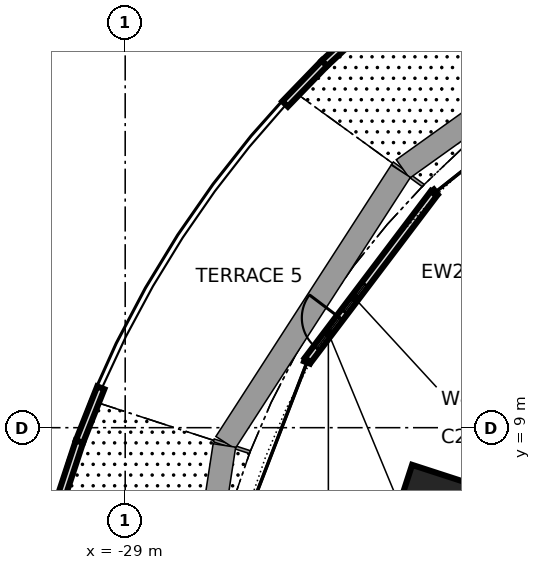
"""IFC4 building model, lengths in metres.
Left out: names, types, materials, properties, quantities, classifications, styles, units other than length and angle.
Written with IfcOpenShell. Run it as: python <this file> out.ifc"""

import sys

from ifc_helpers import new_model, si_unit, direction, frame, frame_2d, origin, origin_2d, place, context, subcontext, project, spatial, rectangle, extrude, element, fill, save


model = new_model("IFC4")
c1 = context("Model", 3, precision=1e-05, world=origin(), true_north=direction((0.0, 1.0)))
c2 = subcontext(c1, "Body", "Model", "MODEL_VIEW")
j1 = project(units=[si_unit("LENGTHUNIT", "METRE"), si_unit("PLANEANGLEUNIT", "RADIAN")], contexts=[c1])
p1 = place(None, origin())
s1 = spatial("IfcSite", under=j1, at=p1, CompositionType="ELEMENT")
p2 = place(p1, origin())
s2 = spatial("IfcBuilding", under=s1, at=p2, CompositionType="ELEMENT")
p3 = place(p2, frame((0.0, 0.0, 19.6)))
s3 = spatial("IfcBuildingStorey", under=s2, at=p3, CompositionType="ELEMENT", Elevation=19.6)
p4 = place(p3, frame((-20.808, 6.761, 0.0), z_axis=(0.0, 0.0, 1.0), x_axis=(-0.951056516295, 0.309016994375, 0.0)))
e1 = element("IfcColumn", 1, at=p4, inside=s3, PredefinedType="COLUMN", context=c2, shape_type="SweptSolid", body=[
    extrude(rectangle(XDim=2.0, YDim=2.0, at=origin_2d()), origin(), (0.0, 0.0, 1.0), 4.2),
])
p5 = place(p3, frame((-20.875, 15.167, 0.0), z_axis=(0.0, 0.0, 1.0), x_axis=(-0.602981695088, -0.797755022164, 0.0)))
e2 = element("IfcWall", 2, at=p5, inside=s3, PredefinedType="SOLIDWALL", context=c2, shape_type="SweptSolid", body=[
    extrude(rectangle(XDim=5.508, YDim=0.2, at=frame_2d((2.754, 0.0))), origin(), (0.0, 0.0, 1.0), 4.04),
])
p6 = place(p5, frame((4.108, 0.0, 0.0)))
e3 = element("IfcOpeningElement", 3, at=p6, cuts=e2, PredefinedType="OPENING", context=c2, shape_type="SweptSolid", body=[
    extrude(rectangle(XDim=1.0, YDim=2.4, at=frame_2d((0.5, 1.2))), frame((0.0, 0.11, 0.0), z_axis=(0.0, -1.0, 0.0), x_axis=(1.0, 0.0, 0.0)), (0.0, 0.0, 1.0), 0.22),
])
p7 = place(p5, frame((3.008, 0.0, 0.3)))
e4 = element("IfcOpeningElement", 4, at=p7, cuts=e2, PredefinedType="OPENING", context=c2, shape_type="SweptSolid", body=[
    extrude(rectangle(XDim=0.9, YDim=2.1, at=frame_2d((0.45, 1.05))), frame((0.0, 0.11, 0.0), z_axis=(0.0, -1.0, 0.0), x_axis=(1.0, 0.0, 0.0)), (0.0, 0.0, 1.0), 0.22),
])
p8 = place(p5, frame((4.108, 0.0, 2.7)))
e5 = element("IfcOpeningElement", 5, at=p8, cuts=e2, PredefinedType="OPENING", context=c2, shape_type="SweptSolid", body=[
    extrude(rectangle(XDim=1.0, YDim=0.6, at=frame_2d((0.5, 0.3))), frame((0.0, 0.11, 0.0), z_axis=(0.0, -1.0, 0.0), x_axis=(1.0, 0.0, 0.0)), (0.0, 0.0, 1.0), 0.22),
])
p9 = place(p3, frame((-22.676, 19.594, 0.0), z_axis=(0.0, 0.0, 1.0), x_axis=(-0.73256401107, -0.68069814873, 0.0)))
e6 = element("IfcWall", 6, at=p9, inside=s3, PredefinedType="PARAPET", context=c2, shape_type="SweptSolid", body=[
    extrude(rectangle(XDim=1.478, YDim=0.2, at=frame_2d((0.739, 0.0))), origin(), (0.0, 0.0, 1.0), 1.1),
])
p10 = place(p3, frame((-23.759, 18.588, 0.0), z_axis=(0.0, 0.0, 1.0), x_axis=(-0.695098509387, -0.718914502738, 0.0)))
e7 = element("IfcWall", 7, at=p10, inside=s3, PredefinedType="PARAPET", context=c2, shape_type="SweptSolid", body=[
    extrude(rectangle(XDim=1.486, YDim=0.2, at=frame_2d((0.743, 0.0))), origin(), (0.0, 0.0, 1.0), 1.1),
])
p11 = place(p3, frame((-29.642, 10.05, 0.0), z_axis=(0.0, 0.0, 1.0), x_axis=(-0.368766467575, -0.92952207741, 0.0)))
e8 = element("IfcWall", 8, at=p11, inside=s3, PredefinedType="PARAPET", context=c2, shape_type="SweptSolid", body=[
    extrude(rectangle(XDim=1.525, YDim=0.2, at=frame_2d((0.762, 0.0))), origin(), (0.0, 0.0, 1.0), 1.1),
])
p12 = place(p3, frame((-30.204, 8.633, 0.0), z_axis=(0.0, 0.0, 1.0), x_axis=(-0.313063429315, -0.949732219747, 0.0)))
e9 = element("IfcWall", 9, at=p12, inside=s3, PredefinedType="PARAPET", context=c2, shape_type="SweptSolid", body=[
    extrude(rectangle(XDim=1.529, YDim=0.2, at=frame_2d((0.764, 0.0))), origin(), (0.0, 0.0, 1.0), 1.1),
])
p13 = place(p6, frame((1.0, 0.0, 0.0), z_axis=(0.0, 0.0, 1.0), x_axis=(-1.0, 0.0, 0.0)))
e10 = element("IfcDoor", 10, at=p13, inside=s3, OperationType="SINGLE_SWING_RIGHT", PredefinedType="DOOR", context=c2, shape_type="SweptSolid", body=[
    extrude(rectangle(XDim=1.0, YDim=2.4, at=frame_2d((0.5, 1.2))), frame((0.0, 0.025, 0.0), z_axis=(0.0, -1.0, 0.0), x_axis=(1.0, 0.0, 0.0)), (0.0, 0.0, 1.0), 0.05),
])
fill(e3, e10)
p14 = place(p7, origin())
e11 = element("IfcWindow", 11, at=p14, inside=s3, PartitioningType="SINGLE_PANEL", PredefinedType="WINDOW", context=c2, shape_type="SweptSolid", body=[
    extrude(rectangle(XDim=0.9, YDim=2.1, at=frame_2d((0.45, 1.05))), frame((0.0, 0.03, 0.0), z_axis=(0.0, -1.0, 0.0), x_axis=(1.0, 0.0, 0.0)), (0.0, 0.0, 1.0), 0.06),
])
fill(e4, e11)
p15 = place(p8, origin())
e12 = element("IfcWindow", 12, at=p15, inside=s3, PartitioningType="SINGLE_PANEL", PredefinedType="WINDOW", context=c2, shape_type="SweptSolid", body=[
    extrude(rectangle(XDim=1.0, YDim=0.6, at=frame_2d((0.5, 0.3))), frame((0.0, 0.03, 0.0), z_axis=(0.0, -1.0, 0.0), x_axis=(1.0, 0.0, 0.0)), (0.0, 0.0, 1.0), 0.06),
])
fill(e5, e12)
save(model, sys.argv[1])
